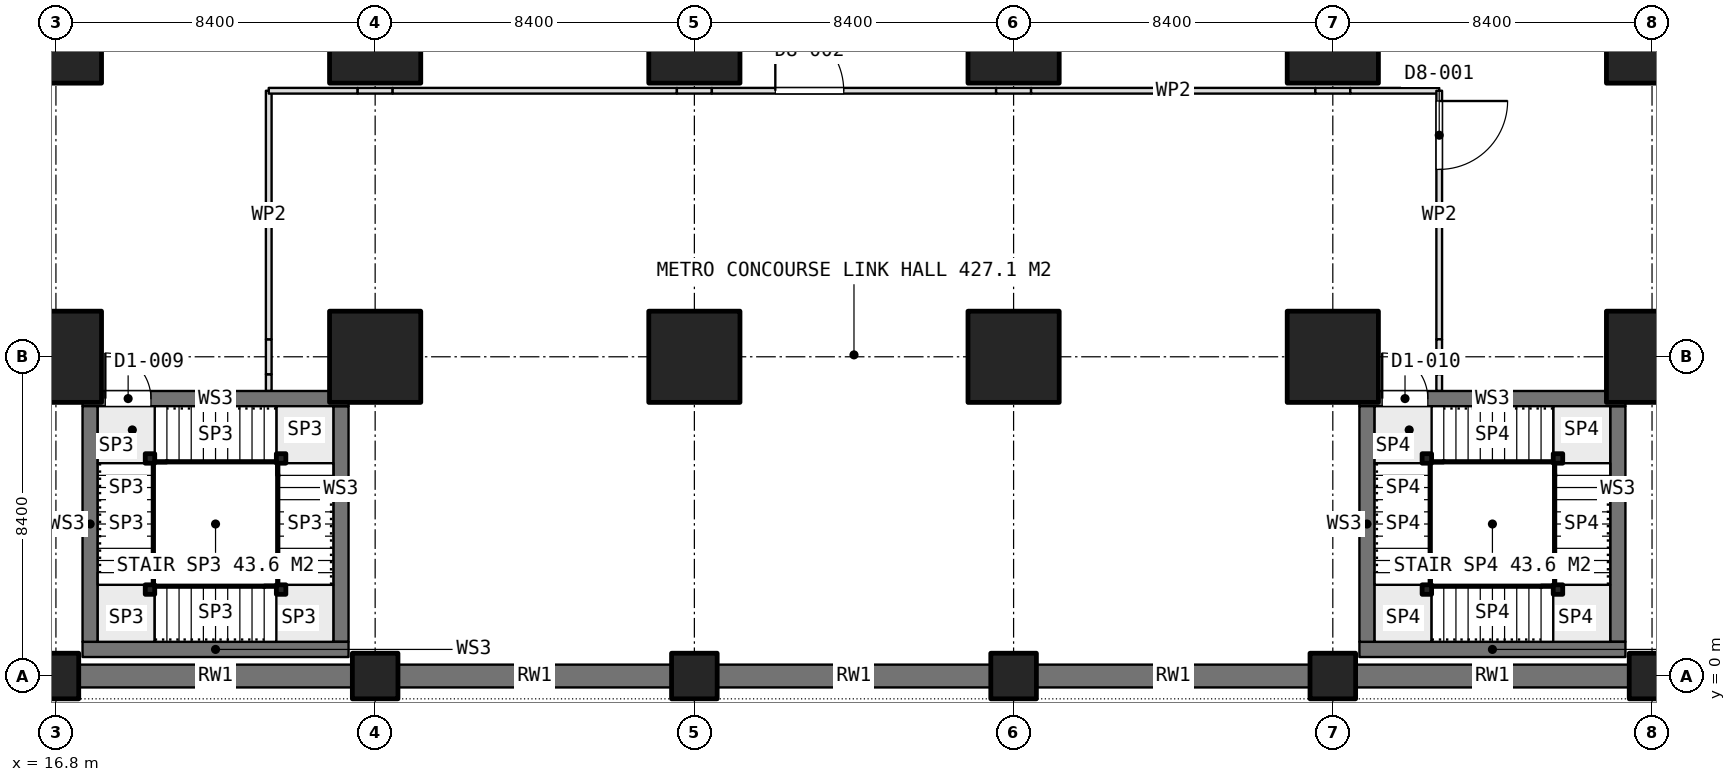
"""IFC4 building model, lengths in metres.
Left out: names, types, materials, properties, quantities, classifications, styles, units other than length and angle.
Written with IfcOpenShell. Run it as: python <this file> out.ifc"""

import sys

from ifc_helpers import new_model, si_unit, direction, frame, frame_2d, origin, origin_2d, place, context, subcontext, project, spatial, rectangle, extrude, element, fill, save


model = new_model("IFC4")
c1 = context("Model", 3, precision=1e-05, world=origin(), true_north=direction((0.0, 1.0)))
c2 = subcontext(c1, "Body", "Model", "MODEL_VIEW")
j1 = project(units=[si_unit("LENGTHUNIT", "METRE"), si_unit("PLANEANGLEUNIT", "RADIAN")], contexts=[c1])
p1 = place(None, origin())
s1 = spatial("IfcSite", under=j1, at=p1, CompositionType="ELEMENT")
p2 = place(p1, origin())
s2 = spatial("IfcBuilding", under=s1, at=p2, CompositionType="ELEMENT")
p3 = place(p2, frame((0.0, 0.0, -5.4)))
s3 = spatial("IfcBuildingStorey", under=s2, at=p3, CompositionType="ELEMENT", Elevation=-5.4)
p4 = place(p3, frame((16.8, 0.0, 0.0), z_axis=(0.0, 0.0, 1.0), x_axis=(1.0, 0.0, 0.0)))
e1 = element("IfcColumn", 1, at=p4, inside=s3, PredefinedType="COLUMN", context=c2, shape_type="SweptSolid", body=[
    extrude(rectangle(XDim=1.2, YDim=1.2, at=origin_2d()), origin(), (0.0, 0.0, 1.0), 5.4),
])
for number, where, z_axis, x_axis in (
    (2, (16.8, 8.4, 0.0), (0.0, 0.0, 1.0), (1.0, 0.0, 0.0)),
    (3, (16.8, 16.8, 0.0), (0.0, 0.0, 1.0), (1.0, 0.0, 0.0)),
):
    element("IfcColumn", number, at=place(p3, frame(where, z_axis=z_axis, x_axis=x_axis)), inside=s3, PredefinedType="COLUMN", context=c2, shape_type="SweptSolid", body=[
        extrude(rectangle(XDim=2.4, YDim=2.4, at=origin_2d()), origin(), (0.0, 0.0, 1.0), 5.4),
    ])
p5 = place(p3, frame((25.2, 0.0, 0.0), z_axis=(0.0, 0.0, 1.0), x_axis=(1.0, 0.0, 0.0)))
e4 = element("IfcColumn", 4, at=p5, inside=s3, PredefinedType="COLUMN", context=c2, shape_type="SweptSolid", body=[
    extrude(rectangle(XDim=1.2, YDim=1.2, at=origin_2d()), origin(), (0.0, 0.0, 1.0), 5.4),
])
for number, where, z_axis, x_axis in (
    (5, (25.2, 8.4, 0.0), (0.0, 0.0, 1.0), (1.0, 0.0, 0.0)),
    (6, (25.2, 16.8, 0.0), (0.0, 0.0, 1.0), (1.0, 0.0, 0.0)),
):
    element("IfcColumn", number, at=place(p3, frame(where, z_axis=z_axis, x_axis=x_axis)), inside=s3, PredefinedType="COLUMN", context=c2, shape_type="SweptSolid", body=[
        extrude(rectangle(XDim=2.4, YDim=2.4, at=origin_2d()), origin(), (0.0, 0.0, 1.0), 5.4),
    ])
p6 = place(p3, frame((33.6, 0.0, 0.0), z_axis=(0.0, 0.0, 1.0), x_axis=(1.0, 0.0, 0.0)))
e7 = element("IfcColumn", 7, at=p6, inside=s3, PredefinedType="COLUMN", context=c2, shape_type="SweptSolid", body=[
    extrude(rectangle(XDim=1.2, YDim=1.2, at=origin_2d()), origin(), (0.0, 0.0, 1.0), 5.4),
])
for number, where, z_axis, x_axis in (
    (8, (33.6, 8.4, 0.0), (0.0, 0.0, 1.0), (1.0, 0.0, 0.0)),
    (9, (33.6, 16.8, 0.0), (0.0, 0.0, 1.0), (1.0, 0.0, 0.0)),
):
    element("IfcColumn", number, at=place(p3, frame(where, z_axis=z_axis, x_axis=x_axis)), inside=s3, PredefinedType="COLUMN", context=c2, shape_type="SweptSolid", body=[
        extrude(rectangle(XDim=2.4, YDim=2.4, at=origin_2d()), origin(), (0.0, 0.0, 1.0), 5.4),
    ])
p7 = place(p3, frame((42.0, 0.0, 0.0), z_axis=(0.0, 0.0, 1.0), x_axis=(1.0, 0.0, 0.0)))
e10 = element("IfcColumn", 10, at=p7, inside=s3, PredefinedType="COLUMN", context=c2, shape_type="SweptSolid", body=[
    extrude(rectangle(XDim=1.2, YDim=1.2, at=origin_2d()), origin(), (0.0, 0.0, 1.0), 5.4),
])
for number, where, z_axis, x_axis in (
    (11, (42.0, 8.4, 0.0), (0.0, 0.0, 1.0), (1.0, 0.0, 0.0)),
    (12, (42.0, 16.8, 0.0), (0.0, 0.0, 1.0), (1.0, 0.0, 0.0)),
):
    element("IfcColumn", number, at=place(p3, frame(where, z_axis=z_axis, x_axis=x_axis)), inside=s3, PredefinedType="COLUMN", context=c2, shape_type="SweptSolid", body=[
        extrude(rectangle(XDim=2.4, YDim=2.4, at=origin_2d()), origin(), (0.0, 0.0, 1.0), 5.4),
    ])
p8 = place(p3, frame((50.4, 0.0, 0.0), z_axis=(0.0, 0.0, 1.0), x_axis=(1.0, 0.0, 0.0)))
e13 = element("IfcColumn", 13, at=p8, inside=s3, PredefinedType="COLUMN", context=c2, shape_type="SweptSolid", body=[
    extrude(rectangle(XDim=1.2, YDim=1.2, at=origin_2d()), origin(), (0.0, 0.0, 1.0), 5.4),
])
for number, where, z_axis, x_axis in (
    (14, (50.4, 8.4, 0.0), (0.0, 0.0, 1.0), (1.0, 0.0, 0.0)),
    (15, (50.4, 16.8, 0.0), (0.0, 0.0, 1.0), (1.0, 0.0, 0.0)),
):
    element("IfcColumn", number, at=place(p3, frame(where, z_axis=z_axis, x_axis=x_axis)), inside=s3, PredefinedType="COLUMN", context=c2, shape_type="SweptSolid", body=[
        extrude(rectangle(XDim=2.4, YDim=2.4, at=origin_2d()), origin(), (0.0, 0.0, 1.0), 5.4),
    ])
p9 = place(p3, frame((58.8, 0.0, 0.0), z_axis=(0.0, 0.0, 1.0), x_axis=(1.0, 0.0, 0.0)))
e16 = element("IfcColumn", 16, at=p9, inside=s3, PredefinedType="COLUMN", context=c2, shape_type="SweptSolid", body=[
    extrude(rectangle(XDim=1.2, YDim=1.2, at=origin_2d()), origin(), (0.0, 0.0, 1.0), 5.4),
])
for number, where, z_axis, x_axis in (
    (17, (58.8, 8.4, 0.0), (0.0, 0.0, 1.0), (1.0, 0.0, 0.0)),
    (18, (58.8, 16.8, 0.0), (0.0, 0.0, 1.0), (1.0, 0.0, 0.0)),
):
    element("IfcColumn", number, at=place(p3, frame(where, z_axis=z_axis, x_axis=x_axis)), inside=s3, PredefinedType="COLUMN", context=c2, shape_type="SweptSolid", body=[
        extrude(rectangle(XDim=2.4, YDim=2.4, at=origin_2d()), origin(), (0.0, 0.0, 1.0), 5.4),
    ])
p10 = place(p3, frame((17.4, 0.0, 0.0), z_axis=(0.0, 0.0, 1.0), x_axis=(1.0, 0.0, 0.0)))
e19 = element("IfcWall", 19, at=p10, inside=s3, PredefinedType="SOLIDWALL", context=c2, shape_type="SweptSolid", body=[
    extrude(rectangle(XDim=7.2, YDim=0.6, at=frame_2d((3.6, 0.0))), origin(), (0.0, 0.0, 1.0), 5.1),
])
for number, where, z_axis, x_axis in (
    (20, (25.8, 0.0, 0.0), (0.0, 0.0, 1.0), (1.0, 0.0, 0.0)),
    (21, (34.2, 0.0, 0.0), (0.0, 0.0, 1.0), (1.0, 0.0, 0.0)),
    (22, (42.6, 0.0, 0.0), (0.0, 0.0, 1.0), (1.0, 0.0, 0.0)),
    (23, (51.0, 0.0, 0.0), (0.0, 0.0, 1.0), (1.0, 0.0, 0.0)),
):
    element("IfcWall", number, at=place(p3, frame(where, z_axis=z_axis, x_axis=x_axis)), inside=s3, PredefinedType="SOLIDWALL", context=c2, shape_type="SweptSolid", body=[
        extrude(rectangle(XDim=7.2, YDim=0.6, at=frame_2d((3.6, 0.0))), origin(), (0.0, 0.0, 1.0), 5.1),
    ])
p11 = place(p3, frame((17.5, 0.7, 0.0), z_axis=(0.0, 0.0, 1.0), x_axis=(1.0, 0.0, 0.0)))
e24 = element("IfcWall", 24, at=p11, inside=s3, PredefinedType="SOLIDWALL", context=c2, shape_type="SweptSolid", body=[
    extrude(rectangle(XDim=7.0, YDim=0.4, at=frame_2d((3.5, 0.0))), origin(), (0.0, 0.0, 1.0), 5.1),
])
p12 = place(p3, frame((17.5, 7.3, 0.0), z_axis=(0.0, 0.0, 1.0), x_axis=(1.0, 0.0, 0.0)))
e25 = element("IfcWall", 25, at=p12, inside=s3, PredefinedType="SOLIDWALL", context=c2, shape_type="SweptSolid", body=[
    extrude(rectangle(XDim=7.0, YDim=0.4, at=frame_2d((3.5, 0.0))), origin(), (0.0, 0.0, 1.0), 5.1),
])
p13 = place(p12, frame((0.6, 0.0, 0.0)))
e26 = element("IfcOpeningElement", 26, at=p13, cuts=e25, PredefinedType="OPENING", context=c2, shape_type="SweptSolid", body=[
    extrude(rectangle(XDim=1.2, YDim=2.1, at=frame_2d((0.6, 1.05))), frame((0.0, 0.21, 0.0), z_axis=(0.0, -1.0, 0.0), x_axis=(1.0, 0.0, 0.0)), (0.0, 0.0, 1.0), 0.42),
])
for number, where, z_axis, x_axis in (
    (27, (17.7, 0.9, 0.0), (0.0, 0.0, 1.0), (0.0, 1.0, 0.0)),
    (28, (24.3, 0.9, 0.0), (0.0, 0.0, 1.0), (0.0, 1.0, 0.0)),
):
    element("IfcWall", number, at=place(p3, frame(where, z_axis=z_axis, x_axis=x_axis)), inside=s3, PredefinedType="SOLIDWALL", context=c2, shape_type="SweptSolid", body=[
        extrude(rectangle(XDim=6.2, YDim=0.4, at=frame_2d((3.1, 0.0))), origin(), (0.0, 0.0, 1.0), 5.1),
    ])
p14 = place(p3, frame((51.1, 0.7, 0.0), z_axis=(0.0, 0.0, 1.0), x_axis=(1.0, 0.0, 0.0)))
e29 = element("IfcWall", 29, at=p14, inside=s3, PredefinedType="SOLIDWALL", context=c2, shape_type="SweptSolid", body=[
    extrude(rectangle(XDim=7.0, YDim=0.4, at=frame_2d((3.5, 0.0))), origin(), (0.0, 0.0, 1.0), 5.1),
])
p15 = place(p3, frame((51.1, 7.3, 0.0), z_axis=(0.0, 0.0, 1.0), x_axis=(1.0, 0.0, 0.0)))
e30 = element("IfcWall", 30, at=p15, inside=s3, PredefinedType="SOLIDWALL", context=c2, shape_type="SweptSolid", body=[
    extrude(rectangle(XDim=7.0, YDim=0.4, at=frame_2d((3.5, 0.0))), origin(), (0.0, 0.0, 1.0), 5.1),
])
p16 = place(p15, frame((0.6, 0.0, 0.0)))
e31 = element("IfcOpeningElement", 31, at=p16, cuts=e30, PredefinedType="OPENING", context=c2, shape_type="SweptSolid", body=[
    extrude(rectangle(XDim=1.2, YDim=2.1, at=frame_2d((0.6, 1.05))), frame((0.0, 0.21, 0.0), z_axis=(0.0, -1.0, 0.0), x_axis=(1.0, 0.0, 0.0)), (0.0, 0.0, 1.0), 0.42),
])
for number, where, z_axis, x_axis in (
    (32, (51.3, 0.9, 0.0), (0.0, 0.0, 1.0), (0.0, 1.0, 0.0)),
    (33, (57.9, 0.9, 0.0), (0.0, 0.0, 1.0), (0.0, 1.0, 0.0)),
):
    element("IfcWall", number, at=place(p3, frame(where, z_axis=z_axis, x_axis=x_axis)), inside=s3, PredefinedType="SOLIDWALL", context=c2, shape_type="SweptSolid", body=[
        extrude(rectangle(XDim=6.2, YDim=0.4, at=frame_2d((3.1, 0.0))), origin(), (0.0, 0.0, 1.0), 5.1),
    ])
p17 = place(p3, frame((22.4, 7.5, 0.0), z_axis=(0.0, 0.0, 1.0), x_axis=(0.0, 1.0, 0.0)))
e34 = element("IfcWall", 34, at=p17, inside=s3, PredefinedType="PARTITIONING", context=c2, shape_type="SweptSolid", body=[
    extrude(rectangle(XDim=0.44, YDim=0.15, at=frame_2d((0.22, 0.0))), origin(), (0.0, 0.0, 1.0), 5.1),
])
p18 = place(p3, frame((22.4, 7.94, 0.0), z_axis=(0.0, 0.0, 1.0), x_axis=(0.0, 1.0, 0.0)))
e35 = element("IfcWall", 35, at=p18, inside=s3, PredefinedType="PARTITIONING", context=c2, shape_type="SweptSolid", body=[
    extrude(rectangle(XDim=0.92, YDim=0.15, at=frame_2d((0.46, 0.0))), origin(), (0.0, 0.0, 1.0), 3.3),
])
p19 = place(p3, frame((22.4, 8.86, 0.0), z_axis=(0.0, 0.0, 1.0), x_axis=(0.0, 1.0, 0.0)))
e36 = element("IfcWall", 36, at=p19, inside=s3, PredefinedType="PARTITIONING", context=c2, shape_type="SweptSolid", body=[
    extrude(rectangle(XDim=6.54, YDim=0.15, at=frame_2d((3.27, 0.0))), origin(), (0.0, 0.0, 1.0), 5.1),
])
p20 = place(p3, frame((22.4, 15.4, 0.0), z_axis=(0.0, 0.0, 1.0), x_axis=(1.0, 0.0, 0.0)))
e37 = element("IfcWall", 37, at=p20, inside=s3, PredefinedType="PARTITIONING", context=c2, shape_type="SweptSolid", body=[
    extrude(rectangle(XDim=2.34, YDim=0.15, at=frame_2d((1.17, 0.0))), origin(), (0.0, 0.0, 1.0), 5.1),
])
p21 = place(p3, frame((24.74, 15.4, 0.0), z_axis=(0.0, 0.0, 1.0), x_axis=(1.0, 0.0, 0.0)))
e38 = element("IfcWall", 38, at=p21, inside=s3, PredefinedType="PARTITIONING", context=c2, shape_type="SweptSolid", body=[
    extrude(rectangle(XDim=0.92, YDim=0.15, at=frame_2d((0.46, 0.0))), origin(), (0.0, 0.0, 1.0), 3.3),
])
p22 = place(p3, frame((25.66, 15.4, 0.0), z_axis=(0.0, 0.0, 1.0), x_axis=(1.0, 0.0, 0.0)))
e39 = element("IfcWall", 39, at=p22, inside=s3, PredefinedType="PARTITIONING", context=c2, shape_type="SweptSolid", body=[
    extrude(rectangle(XDim=7.48, YDim=0.15, at=frame_2d((3.74, 0.0))), origin(), (0.0, 0.0, 1.0), 5.1),
])
p23 = place(p3, frame((33.14, 15.4, 0.0), z_axis=(0.0, 0.0, 1.0), x_axis=(1.0, 0.0, 0.0)))
e40 = element("IfcWall", 40, at=p23, inside=s3, PredefinedType="PARTITIONING", context=c2, shape_type="SweptSolid", body=[
    extrude(rectangle(XDim=0.92, YDim=0.15, at=frame_2d((0.46, 0.0))), origin(), (0.0, 0.0, 1.0), 3.3),
])
p24 = place(p3, frame((34.06, 15.4, 0.0), z_axis=(0.0, 0.0, 1.0), x_axis=(1.0, 0.0, 0.0)))
e41 = element("IfcWall", 41, at=p24, inside=s3, PredefinedType="PARTITIONING", context=c2, shape_type="SweptSolid", body=[
    extrude(rectangle(XDim=7.48, YDim=0.15, at=frame_2d((3.74, 0.0))), origin(), (0.0, 0.0, 1.0), 5.1),
])
p25 = place(p24, frame((1.67, 0.0, 0.0)))
e42 = element("IfcOpeningElement", 42, at=p25, cuts=e41, PredefinedType="OPENING", context=c2, shape_type="SweptSolid", body=[
    extrude(rectangle(XDim=1.8, YDim=2.1, at=frame_2d((0.9, 1.05))), frame((0.0, 0.085, 0.0), z_axis=(0.0, -1.0, 0.0), x_axis=(1.0, 0.0, 0.0)), (0.0, 0.0, 1.0), 0.17),
])
p26 = place(p3, frame((41.54, 15.4, 0.0), z_axis=(0.0, 0.0, 1.0), x_axis=(1.0, 0.0, 0.0)))
e43 = element("IfcWall", 43, at=p26, inside=s3, PredefinedType="PARTITIONING", context=c2, shape_type="SweptSolid", body=[
    extrude(rectangle(XDim=0.92, YDim=0.15, at=frame_2d((0.46, 0.0))), origin(), (0.0, 0.0, 1.0), 3.3),
])
p27 = place(p3, frame((42.46, 15.4, 0.0), z_axis=(0.0, 0.0, 1.0), x_axis=(1.0, 0.0, 0.0)))
e44 = element("IfcWall", 44, at=p27, inside=s3, PredefinedType="PARTITIONING", context=c2, shape_type="SweptSolid", body=[
    extrude(rectangle(XDim=7.48, YDim=0.15, at=frame_2d((3.74, 0.0))), origin(), (0.0, 0.0, 1.0), 5.1),
])
p28 = place(p3, frame((49.94, 15.4, 0.0), z_axis=(0.0, 0.0, 1.0), x_axis=(1.0, 0.0, 0.0)))
e45 = element("IfcWall", 45, at=p28, inside=s3, PredefinedType="PARTITIONING", context=c2, shape_type="SweptSolid", body=[
    extrude(rectangle(XDim=0.92, YDim=0.15, at=frame_2d((0.46, 0.0))), origin(), (0.0, 0.0, 1.0), 3.3),
])
p29 = place(p3, frame((50.86, 15.4, 0.0), z_axis=(0.0, 0.0, 1.0), x_axis=(1.0, 0.0, 0.0)))
e46 = element("IfcWall", 46, at=p29, inside=s3, PredefinedType="PARTITIONING", context=c2, shape_type="SweptSolid", body=[
    extrude(rectangle(XDim=2.34, YDim=0.15, at=frame_2d((1.17, 0.0))), origin(), (0.0, 0.0, 1.0), 5.1),
])
p30 = place(p3, frame((53.2, 15.4, 0.0), z_axis=(0.0, 0.0, 1.0), x_axis=(0.0, -1.0, 0.0)))
e47 = element("IfcWall", 47, at=p30, inside=s3, PredefinedType="PARTITIONING", context=c2, shape_type="SweptSolid", body=[
    extrude(rectangle(XDim=6.54, YDim=0.15, at=frame_2d((3.27, 0.0))), origin(), (0.0, 0.0, 1.0), 5.1),
])
p31 = place(p30, frame((0.27, 0.0, 0.0)))
e48 = element("IfcOpeningElement", 48, at=p31, cuts=e47, PredefinedType="OPENING", context=c2, shape_type="SweptSolid", body=[
    extrude(rectangle(XDim=1.8, YDim=2.1, at=frame_2d((0.9, 1.05))), frame((0.0, 0.085, 0.0), z_axis=(0.0, -1.0, 0.0), x_axis=(1.0, 0.0, 0.0)), (0.0, 0.0, 1.0), 0.17),
])
p32 = place(p3, frame((53.2, 8.86, 0.0), z_axis=(0.0, 0.0, 1.0), x_axis=(0.0, -1.0, 0.0)))
e49 = element("IfcWall", 49, at=p32, inside=s3, PredefinedType="PARTITIONING", context=c2, shape_type="SweptSolid", body=[
    extrude(rectangle(XDim=0.92, YDim=0.15, at=frame_2d((0.46, 0.0))), origin(), (0.0, 0.0, 1.0), 3.3),
])
p33 = place(p3, frame((53.2, 7.94, 0.0), z_axis=(0.0, 0.0, 1.0), x_axis=(0.0, -1.0, 0.0)))
e50 = element("IfcWall", 50, at=p33, inside=s3, PredefinedType="PARTITIONING", context=c2, shape_type="SweptSolid", body=[
    extrude(rectangle(XDim=0.44, YDim=0.15, at=frame_2d((0.22, 0.0))), origin(), (0.0, 0.0, 1.0), 5.1),
])
for number, where, z_axis, x_axis in (
    (51, (19.275, 5.725, 0.0), (0.0, 0.0, 1.0), (1.0, 0.0, 0.0)),
    (52, (19.275, 2.275, 0.0), (0.0, 0.0, 1.0), (1.0, 0.0, 0.0)),
    (53, (22.725, 2.275, 0.0), (0.0, 0.0, 1.0), (1.0, 0.0, 0.0)),
    (54, (22.725, 5.725, 0.0), (0.0, 0.0, 1.0), (1.0, 0.0, 0.0)),
    (55, (52.875, 5.725, 0.0), (0.0, 0.0, 1.0), (1.0, 0.0, 0.0)),
    (56, (52.875, 2.275, 0.0), (0.0, 0.0, 1.0), (1.0, 0.0, 0.0)),
    (57, (56.325, 2.275, 0.0), (0.0, 0.0, 1.0), (1.0, 0.0, 0.0)),
    (58, (56.325, 5.725, 0.0), (0.0, 0.0, 1.0), (1.0, 0.0, 0.0)),
):
    element("IfcColumn", number, at=place(p3, frame(where, z_axis=z_axis, x_axis=x_axis)), inside=s3, PredefinedType="COLUMN", context=c2, shape_type="SweptSolid", body=[
        extrude(rectangle(XDim=0.25, YDim=0.25, at=origin_2d()), origin(), (0.0, 0.0, 1.0), 5.4),
    ])
p34 = place(p25, origin())
e59 = element("IfcDoor", 59, at=p34, inside=s3, OperationType="DOUBLE_DOOR_SINGLE_SWING", PredefinedType="DOOR", context=c2, shape_type="SweptSolid", body=[
    extrude(rectangle(XDim=1.8, YDim=2.1, at=frame_2d((0.9, 1.05))), frame((0.0, 0.025, 0.0), z_axis=(0.0, -1.0, 0.0), x_axis=(1.0, 0.0, 0.0)), (0.0, 0.0, 1.0), 0.05),
])
fill(e42, e59)
p35 = place(p31, origin())
e60 = element("IfcDoor", 60, at=p35, inside=s3, OperationType="DOUBLE_DOOR_SINGLE_SWING", PredefinedType="DOOR", context=c2, shape_type="SweptSolid", body=[
    extrude(rectangle(XDim=1.8, YDim=2.1, at=frame_2d((0.9, 1.05))), frame((0.0, 0.025, 0.0), z_axis=(0.0, -1.0, 0.0), x_axis=(1.0, 0.0, 0.0)), (0.0, 0.0, 1.0), 0.05),
])
fill(e48, e60)
p36 = place(p13, origin())
e61 = element("IfcDoor", 61, at=p36, inside=s3, OperationType="SINGLE_SWING_RIGHT", PredefinedType="DOOR", context=c2, shape_type="SweptSolid", body=[
    extrude(rectangle(XDim=1.2, YDim=2.1, at=frame_2d((0.6, 1.05))), frame((0.0, 0.025, 0.0), z_axis=(0.0, -1.0, 0.0), x_axis=(1.0, 0.0, 0.0)), (0.0, 0.0, 1.0), 0.05),
])
fill(e26, e61)
p37 = place(p16, origin())
e62 = element("IfcDoor", 62, at=p37, inside=s3, OperationType="SINGLE_SWING_RIGHT", PredefinedType="DOOR", context=c2, shape_type="SweptSolid", body=[
    extrude(rectangle(XDim=1.2, YDim=2.1, at=frame_2d((0.6, 1.05))), frame((0.0, 0.025, 0.0), z_axis=(0.0, -1.0, 0.0), x_axis=(1.0, 0.0, 0.0)), (0.0, 0.0, 1.0), 0.05),
])
fill(e31, e62)
save(model, sys.argv[1])
